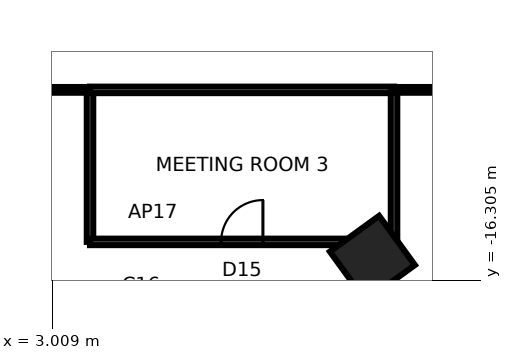
"""IFC4 building model, lengths in metres.
Left out: names, types, materials, properties, quantities, classifications, styles, units other than length and angle.
Written with IfcOpenShell. Run it as: python <this file> out.ifc"""

import sys

from ifc_helpers import new_model, si_unit, direction, frame, frame_2d, origin, origin_2d, place, context, subcontext, project, spatial, rectangle, extrude, element, fill, save


model = new_model("IFC4")
c1 = context("Model", 3, precision=1e-05, world=origin(), true_north=direction((0.0, 1.0)))
c2 = subcontext(c1, "Body", "Model", "MODEL_VIEW")
j1 = project(units=[si_unit("LENGTHUNIT", "METRE"), si_unit("PLANEANGLEUNIT", "RADIAN")], contexts=[c1])
p1 = place(None, origin())
s1 = spatial("IfcSite", under=j1, at=p1, CompositionType="ELEMENT")
p2 = place(p1, origin())
s2 = spatial("IfcBuilding", under=s1, at=p2, CompositionType="ELEMENT")
p3 = place(p2, frame((0.0, 0.0, 127.5)))
s3 = spatial("IfcBuildingStorey", under=s2, at=p3, CompositionType="ELEMENT", Elevation=127.5)
p4 = place(p3, frame((11.43, -15.733, 0.0), z_axis=(0.0, 0.0, 1.0), x_axis=(0.587785252292, -0.809016994375, 0.0)))
e1 = element("IfcColumn", 1, at=p4, inside=s3, PredefinedType="COLUMN", context=c2, shape_type="SweptSolid", body=[
    extrude(rectangle(XDim=1.6, YDim=1.6, at=origin_2d()), origin(), (0.0, 0.0, 1.0), 3.9),
])
p5 = place(p3, frame((0.5, -11.3, 0.0), z_axis=(0.0, 0.0, 1.0), x_axis=(1.0, 0.0, 0.0)))
e2 = element("IfcWall", 2, at=p5, inside=s3, PredefinedType="PARTITIONING", context=c2, shape_type="SweptSolid", body=[
    extrude(rectangle(XDim=3.5, YDim=0.15, at=frame_2d((1.75, 0.0))), origin(), (0.0, 0.0, 1.0), 3.74),
])
p6 = place(p3, frame((4.0, -11.3, 0.0), z_axis=(0.0, 0.0, 1.0), x_axis=(0.0, -1.0, 0.0)))
e3 = element("IfcWall", 3, at=p6, inside=s3, PredefinedType="PARTITIONING", context=c2, shape_type="SweptSolid", body=[
    extrude(rectangle(XDim=4.0, YDim=0.17, at=frame_2d((2.0, 0.0))), origin(), (0.0, 0.0, 1.0), 3.74),
])
p7 = place(p3, frame((4.0, -15.3, 0.0), z_axis=(0.0, 0.0, 1.0), x_axis=(1.0, 0.0, 0.0)))
e4 = element("IfcWall", 4, at=p7, inside=s3, PredefinedType="PARTITIONING", context=c2, shape_type="SweptSolid", body=[
    extrude(rectangle(XDim=8.0, YDim=0.17, at=frame_2d((4.0, 0.0))), origin(), (0.0, 0.0, 1.0), 3.286),
])
p8 = place(p7, frame((3.45, 0.0, 0.0)))
e5 = element("IfcOpeningElement", 5, at=p8, cuts=e4, PredefinedType="OPENING", context=c2, shape_type="SweptSolid", body=[
    extrude(rectangle(XDim=1.1, YDim=2.4, at=frame_2d((0.55, 1.2))), frame((0.0, 0.095, 0.0), z_axis=(0.0, -1.0, 0.0), x_axis=(1.0, 0.0, 0.0)), (0.0, 0.0, 1.0), 0.19),
])
p9 = place(p3, frame((12.0, -11.3, 0.0), z_axis=(0.0, 0.0, 1.0), x_axis=(-1.0, 0.0, 0.0)))
e6 = element("IfcWall", 6, at=p9, inside=s3, PredefinedType="PARTITIONING", context=c2, shape_type="SweptSolid", body=[
    extrude(rectangle(XDim=8.0, YDim=0.17, at=frame_2d((4.0, 0.0))), origin(), (0.0, 0.0, 1.0), 3.74),
])
p10 = place(p3, frame((12.0, -15.3, 0.0), z_axis=(0.0, 0.0, 1.0), x_axis=(0.0, 1.0, 0.0)))
e7 = element("IfcWall", 7, at=p10, inside=s3, PredefinedType="PARTITIONING", context=c2, shape_type="SweptSolid", body=[
    extrude(rectangle(XDim=4.0, YDim=0.17, at=frame_2d((2.0, 0.0))), origin(), (0.0, 0.0, 1.0), 3.74),
])
p11 = place(p3, frame((12.0, -11.3, 0.0), z_axis=(0.0, 0.0, 1.0), x_axis=(1.0, 0.0, 0.0)))
e8 = element("IfcWall", 8, at=p11, inside=s3, PredefinedType="PARTITIONING", context=c2, shape_type="SweptSolid", body=[
    extrude(rectangle(XDim=4.0, YDim=0.15, at=frame_2d((2.0, 0.0))), origin(), (0.0, 0.0, 1.0), 3.74),
])
p12 = place(p8, origin())
e9 = element("IfcDoor", 9, at=p12, inside=s3, OperationType="SINGLE_SWING_RIGHT", PredefinedType="DOOR", context=c2, shape_type="SweptSolid", body=[
    extrude(rectangle(XDim=1.1, YDim=2.4, at=frame_2d((0.55, 1.2))), frame((0.0, 0.025, 0.0), z_axis=(0.0, -1.0, 0.0), x_axis=(1.0, 0.0, 0.0)), (0.0, 0.0, 1.0), 0.05),
])
fill(e5, e9)
save(model, sys.argv[1])
